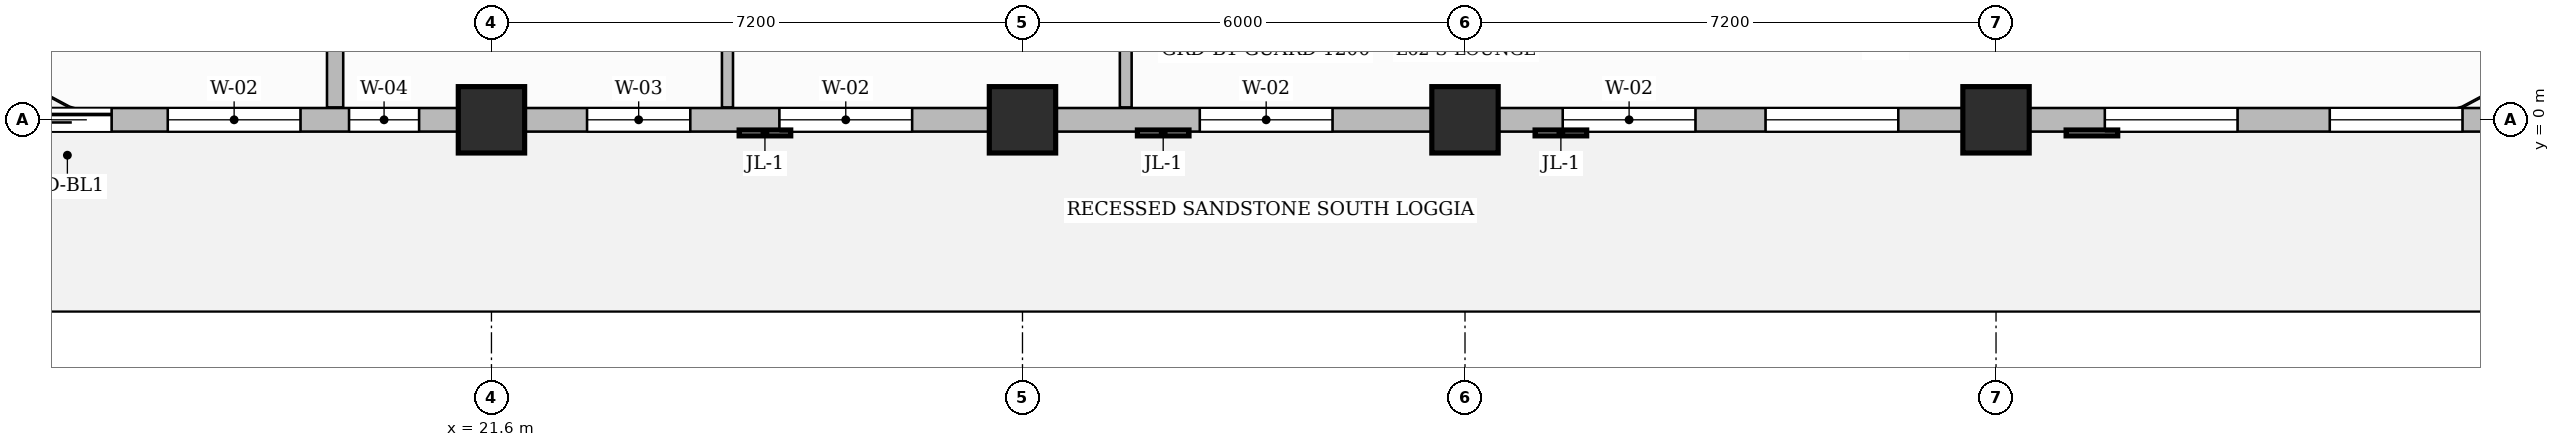
"""IFC4 building model, lengths in metres.
Left out: names, types, materials, properties, quantities, classifications, styles, units other than length and angle.
Written with IfcOpenShell. Run it as: python <this file> out.ifc"""

import sys

from ifc_helpers import new_model, si_unit, direction, frame, frame_2d, origin, origin_2d, place, context, subcontext, project, spatial, rectangle, extrude, source, transform, mapped, element, fill, save


model = new_model("IFC4")
c1 = context("Model", 3, precision=1e-05, world=origin(), true_north=direction((0.0, 1.0)))
c2 = subcontext(c1, "Body", "Model", "MODEL_VIEW")
j1 = project(units=[si_unit("LENGTHUNIT", "METRE"), si_unit("PLANEANGLEUNIT", "RADIAN")], contexts=[c1])
p1 = place(None, origin())
s1 = spatial("IfcSite", under=j1, at=p1, CompositionType="ELEMENT")
p2 = place(p1, origin())
s2 = spatial("IfcBuilding", under=s1, at=p2, CompositionType="ELEMENT")
p3 = place(p2, frame((0.0, 0.0, 248.1)))
s3 = spatial("IfcBuildingStorey", under=s2, at=p3, CompositionType="ELEMENT", Elevation=248.1)
m1 = source(origin(), c2, "Body", "SweptSolid", [
    extrude(rectangle(XDim=0.9, YDim=0.9, at=origin_2d()), origin(), (0.0, 0.0, 1.0), 3.85),
])
for number, where, z_axis, x_axis in (
    (1, (21.6, 0.0, 0.0), (0.0, 0.0, 1.0), (1.0, 0.0, 0.0)),
    (2, (28.8, 0.0, 0.0), (0.0, 0.0, 1.0), (1.0, 0.0, 0.0)),
    (3, (34.8, 0.0, 0.0), (0.0, 0.0, 1.0), (1.0, 0.0, 0.0)),
    (4, (42.0, 0.0, 0.0), (0.0, 0.0, 1.0), (1.0, 0.0, 0.0)),
):
    element("IfcColumn", number, at=place(p3, frame(where, z_axis=z_axis, x_axis=x_axis)), inside=s3, PredefinedType="COLUMN", context=c2, shape_type="MappedRepresentation", body=[
        mapped(m1, transform((0.0, 0.0, 0.0), scale=1.0)),
    ])
p4 = place(p3, frame((30.2, 0.168, 0.0), z_axis=(0.0, 0.0, 1.0), x_axis=(0.0, 1.0, 0.0)))
e5 = element("IfcWall", 5, at=p4, inside=s3, PredefinedType="PARTITIONING", context=c2, shape_type="SweptSolid", body=[
    extrude(rectangle(XDim=9.292, YDim=0.16, at=frame_2d((4.646, 0.0))), origin(), (0.0, 0.0, 1.0), 3.6),
])
p5 = place(p4, frame((1.957, 0.0, 0.0)))
e6 = element("IfcOpeningElement", 6, at=p5, cuts=e5, PredefinedType="OPENING", context=c2, shape_type="SweptSolid", body=[
    extrude(rectangle(XDim=1.05, YDim=2.15, at=frame_2d((0.525, 1.075))), frame((0.0, 0.09, 0.0), z_axis=(0.0, -1.0, 0.0), x_axis=(1.0, 0.0, 0.0)), (0.0, 0.0, 1.0), 0.18),
])
p6 = place(p3, frame((19.48, 0.168, 0.0), z_axis=(0.0, 0.0, 1.0), x_axis=(0.0, 1.0, 0.0)))
e7 = element("IfcWall", 7, at=p6, inside=s3, PredefinedType="PARTITIONING", context=c2, shape_type="SweptSolid", body=[
    extrude(rectangle(XDim=9.292, YDim=0.22, at=frame_2d((4.646, 0.0))), origin(), (0.0, 0.0, 1.0), 3.6),
])
p7 = place(p3, frame((24.8, 0.168, 0.0), z_axis=(0.0, 0.0, 1.0), x_axis=(0.0, 1.0, 0.0)))
e8 = element("IfcWall", 8, at=p7, inside=s3, PredefinedType="PARTITIONING", context=c2, shape_type="SweptSolid", body=[
    extrude(rectangle(XDim=9.292, YDim=0.15, at=frame_2d((4.646, 0.0))), origin(), (0.0, 0.0, 1.0), 3.6),
])
p8 = place(p7, frame((7.857, 0.0, 0.0)))
e9 = element("IfcOpeningElement", 9, at=p8, cuts=e8, PredefinedType="OPENING", context=c2, shape_type="SweptSolid", body=[
    extrude(rectangle(XDim=0.9, YDim=2.15, at=frame_2d((0.45, 1.075))), frame((0.0, 0.085, 0.0), z_axis=(0.0, -1.0, 0.0), x_axis=(1.0, 0.0, 0.0)), (0.0, 0.0, 1.0), 0.17),
])
p9 = place(p3, frame((14.4, 0.0, 0.0), z_axis=(0.0, 0.0, 1.0), x_axis=(1.0, 0.0, 0.0)))
e10 = element("IfcWall", 10, at=p9, inside=s3, PredefinedType="SOLIDWALL", context=c2, shape_type="SweptSolid", body=[
    extrude(rectangle(XDim=35.4, YDim=0.32, at=frame_2d((17.7, 0.0))), origin(), (0.0, 0.0, 1.0), 3.135),
])
p10 = place(p9, frame((0.85, 0.0, 0.0)))
e11 = element("IfcOpeningElement", 11, at=p10, cuts=e10, PredefinedType="OPENING", context=c2, shape_type="SweptSolid", body=[
    extrude(rectangle(XDim=1.2, YDim=2.2, at=frame_2d((0.6, 1.1))), frame((0.0, 0.17, 0.0), z_axis=(0.0, -1.0, 0.0), x_axis=(1.0, 0.0, 0.0)), (0.0, 0.0, 1.0), 0.34),
])
p11 = place(p9, frame((2.811, 0.0, 0.8)))
e12 = element("IfcOpeningElement", 12, at=p11, cuts=e10, PredefinedType="OPENING", context=c2, shape_type="SweptSolid", body=[
    extrude(rectangle(XDim=1.8, YDim=1.85, at=frame_2d((0.9, 0.925))), frame((0.0, 0.17, 0.0), z_axis=(0.0, -1.0, 0.0), x_axis=(1.0, 0.0, 0.0)), (0.0, 0.0, 1.0), 0.34),
])
p12 = place(p9, frame((5.269, 0.0, 0.8)))
e13 = element("IfcOpeningElement", 13, at=p12, cuts=e10, PredefinedType="OPENING", context=c2, shape_type="SweptSolid", body=[
    extrude(rectangle(XDim=0.95, YDim=1.75, at=frame_2d((0.475, 0.875))), frame((0.0, 0.17, 0.0), z_axis=(0.0, -1.0, 0.0), x_axis=(1.0, 0.0, 0.0)), (0.0, 0.0, 1.0), 0.34),
])
p13 = place(p9, frame((8.496, 0.0, 0.8)))
e14 = element("IfcOpeningElement", 14, at=p13, cuts=e10, PredefinedType="OPENING", context=c2, shape_type="SweptSolid", body=[
    extrude(rectangle(XDim=1.4, YDim=1.85, at=frame_2d((0.7, 0.925))), frame((0.0, 0.17, 0.0), z_axis=(0.0, -1.0, 0.0), x_axis=(1.0, 0.0, 0.0)), (0.0, 0.0, 1.0), 0.34),
])
p14 = place(p9, frame((11.104, 0.0, 0.8)))
e15 = element("IfcOpeningElement", 15, at=p14, cuts=e10, PredefinedType="OPENING", context=c2, shape_type="SweptSolid", body=[
    extrude(rectangle(XDim=1.8, YDim=1.85, at=frame_2d((0.9, 0.925))), frame((0.0, 0.17, 0.0), z_axis=(0.0, -1.0, 0.0), x_axis=(1.0, 0.0, 0.0)), (0.0, 0.0, 1.0), 0.34),
])
p15 = place(p9, frame((16.804, 0.0, 0.8)))
e16 = element("IfcOpeningElement", 16, at=p15, cuts=e10, PredefinedType="OPENING", context=c2, shape_type="SweptSolid", body=[
    extrude(rectangle(XDim=1.8, YDim=1.85, at=frame_2d((0.9, 0.925))), frame((0.0, 0.17, 0.0), z_axis=(0.0, -1.0, 0.0), x_axis=(1.0, 0.0, 0.0)), (0.0, 0.0, 1.0), 0.34),
])
p16 = place(p9, frame((21.725, 0.0, 0.8)))
e17 = element("IfcOpeningElement", 17, at=p16, cuts=e10, PredefinedType="OPENING", context=c2, shape_type="SweptSolid", body=[
    extrude(rectangle(XDim=1.8, YDim=1.85, at=frame_2d((0.9, 0.925))), frame((0.0, 0.17, 0.0), z_axis=(0.0, -1.0, 0.0), x_axis=(1.0, 0.0, 0.0)), (0.0, 0.0, 1.0), 0.34),
])
p17 = place(p9, frame((24.475, 0.0, 0.8)))
e18 = element("IfcOpeningElement", 18, at=p17, cuts=e10, PredefinedType="OPENING", context=c2, shape_type="SweptSolid", body=[
    extrude(rectangle(XDim=1.8, YDim=1.85, at=frame_2d((0.9, 0.925))), frame((0.0, 0.17, 0.0), z_axis=(0.0, -1.0, 0.0), x_axis=(1.0, 0.0, 0.0)), (0.0, 0.0, 1.0), 0.34),
])
p18 = place(p9, frame((29.075, 0.0, 0.8)))
e19 = element("IfcOpeningElement", 19, at=p18, cuts=e10, PredefinedType="OPENING", context=c2, shape_type="SweptSolid", body=[
    extrude(rectangle(XDim=1.8, YDim=1.85, at=frame_2d((0.9, 0.925))), frame((0.0, 0.17, 0.0), z_axis=(0.0, -1.0, 0.0), x_axis=(1.0, 0.0, 0.0)), (0.0, 0.0, 1.0), 0.34),
])
p19 = place(p9, frame((32.125, 0.0, 0.8)))
e20 = element("IfcOpeningElement", 20, at=p19, cuts=e10, PredefinedType="OPENING", context=c2, shape_type="SweptSolid", body=[
    extrude(rectangle(XDim=1.8, YDim=1.85, at=frame_2d((0.9, 0.925))), frame((0.0, 0.17, 0.0), z_axis=(0.0, -1.0, 0.0), x_axis=(1.0, 0.0, 0.0)), (0.0, 0.0, 1.0), 0.34),
])
m2 = source(origin(), c2, "Body", "SweptSolid", [
    extrude(rectangle(XDim=1.2, YDim=2.2, at=frame_2d((0.6, 1.1))), frame((0.0, 0.025, 0.0), z_axis=(0.0, -1.0, 0.0), x_axis=(1.0, 0.0, 0.0)), (0.0, 0.0, 1.0), 0.05),
])
p20 = place(p10, origin())
e21 = element("IfcDoor", 21, at=p20, inside=s3, OperationType="SLIDING_TO_LEFT", PredefinedType="DOOR", context=c2, shape_type="MappedRepresentation", body=[
    mapped(m2, transform((0.0, 0.0, 0.0), scale=1.0)),
])
fill(e11, e21)
m3 = source(origin(), c2, "Body", "SweptSolid", [
    extrude(rectangle(XDim=1.8, YDim=1.85, at=frame_2d((0.9, 0.925))), frame((0.0, 0.03, 0.0), z_axis=(0.0, -1.0, 0.0), x_axis=(1.0, 0.0, 0.0)), (0.0, 0.0, 1.0), 0.06),
])
p21 = place(p11, origin())
e22 = element("IfcWindow", 22, at=p21, inside=s3, PartitioningType="DOUBLE_PANEL_VERTICAL", PredefinedType="WINDOW", context=c2, shape_type="MappedRepresentation", body=[
    mapped(m3, transform((0.0, 0.0, 0.0), scale=1.0)),
])
fill(e12, e22)
m4 = source(origin(), c2, "Body", "SweptSolid", [
    extrude(rectangle(XDim=0.95, YDim=1.75, at=frame_2d((0.475, 0.875))), frame((0.0, 0.03, 0.0), z_axis=(0.0, -1.0, 0.0), x_axis=(1.0, 0.0, 0.0)), (0.0, 0.0, 1.0), 0.06),
])
p22 = place(p12, origin())
e23 = element("IfcWindow", 23, at=p22, inside=s3, PartitioningType="SINGLE_PANEL", PredefinedType="WINDOW", context=c2, shape_type="MappedRepresentation", body=[
    mapped(m4, transform((0.0, 0.0, 0.0), scale=1.0)),
])
fill(e13, e23)
m5 = source(origin(), c2, "Body", "SweptSolid", [
    extrude(rectangle(XDim=1.4, YDim=1.85, at=frame_2d((0.7, 0.925))), frame((0.0, 0.03, 0.0), z_axis=(0.0, -1.0, 0.0), x_axis=(1.0, 0.0, 0.0)), (0.0, 0.0, 1.0), 0.06),
])
p23 = place(p13, origin())
e24 = element("IfcWindow", 24, at=p23, inside=s3, PartitioningType="SINGLE_PANEL", PredefinedType="WINDOW", context=c2, shape_type="MappedRepresentation", body=[
    mapped(m5, transform((0.0, 0.0, 0.0), scale=1.0)),
])
fill(e14, e24)
p24 = place(p14, origin())
e25 = element("IfcWindow", 25, at=p24, inside=s3, PartitioningType="DOUBLE_PANEL_VERTICAL", PredefinedType="WINDOW", context=c2, shape_type="MappedRepresentation", body=[
    mapped(m3, transform((0.0, 0.0, 0.0), scale=1.0)),
])
fill(e15, e25)
p25 = place(p15, origin())
e26 = element("IfcWindow", 26, at=p25, inside=s3, PartitioningType="DOUBLE_PANEL_VERTICAL", PredefinedType="WINDOW", context=c2, shape_type="MappedRepresentation", body=[
    mapped(m3, transform((0.0, 0.0, 0.0), scale=1.0)),
])
fill(e16, e26)
p26 = place(p16, origin())
e27 = element("IfcWindow", 27, at=p26, inside=s3, PartitioningType="DOUBLE_PANEL_VERTICAL", PredefinedType="WINDOW", context=c2, shape_type="MappedRepresentation", body=[
    mapped(m3, transform((0.0, 0.0, 0.0), scale=1.0)),
])
fill(e17, e27)
p27 = place(p17, origin())
e28 = element("IfcWindow", 28, at=p27, inside=s3, PartitioningType="DOUBLE_PANEL_VERTICAL", PredefinedType="WINDOW", context=c2, shape_type="MappedRepresentation", body=[
    mapped(m3, transform((0.0, 0.0, 0.0), scale=1.0)),
])
fill(e18, e28)
p28 = place(p18, origin())
e29 = element("IfcWindow", 29, at=p28, inside=s3, PartitioningType="DOUBLE_PANEL_VERTICAL", PredefinedType="WINDOW", context=c2, shape_type="MappedRepresentation", body=[
    mapped(m3, transform((0.0, 0.0, 0.0), scale=1.0)),
])
fill(e19, e29)
p29 = place(p19, origin())
e30 = element("IfcWindow", 30, at=p29, inside=s3, PartitioningType="DOUBLE_PANEL_VERTICAL", PredefinedType="WINDOW", context=c2, shape_type="MappedRepresentation", body=[
    mapped(m3, transform((0.0, 0.0, 0.0), scale=1.0)),
])
fill(e20, e30)
save(model, sys.argv[1])
